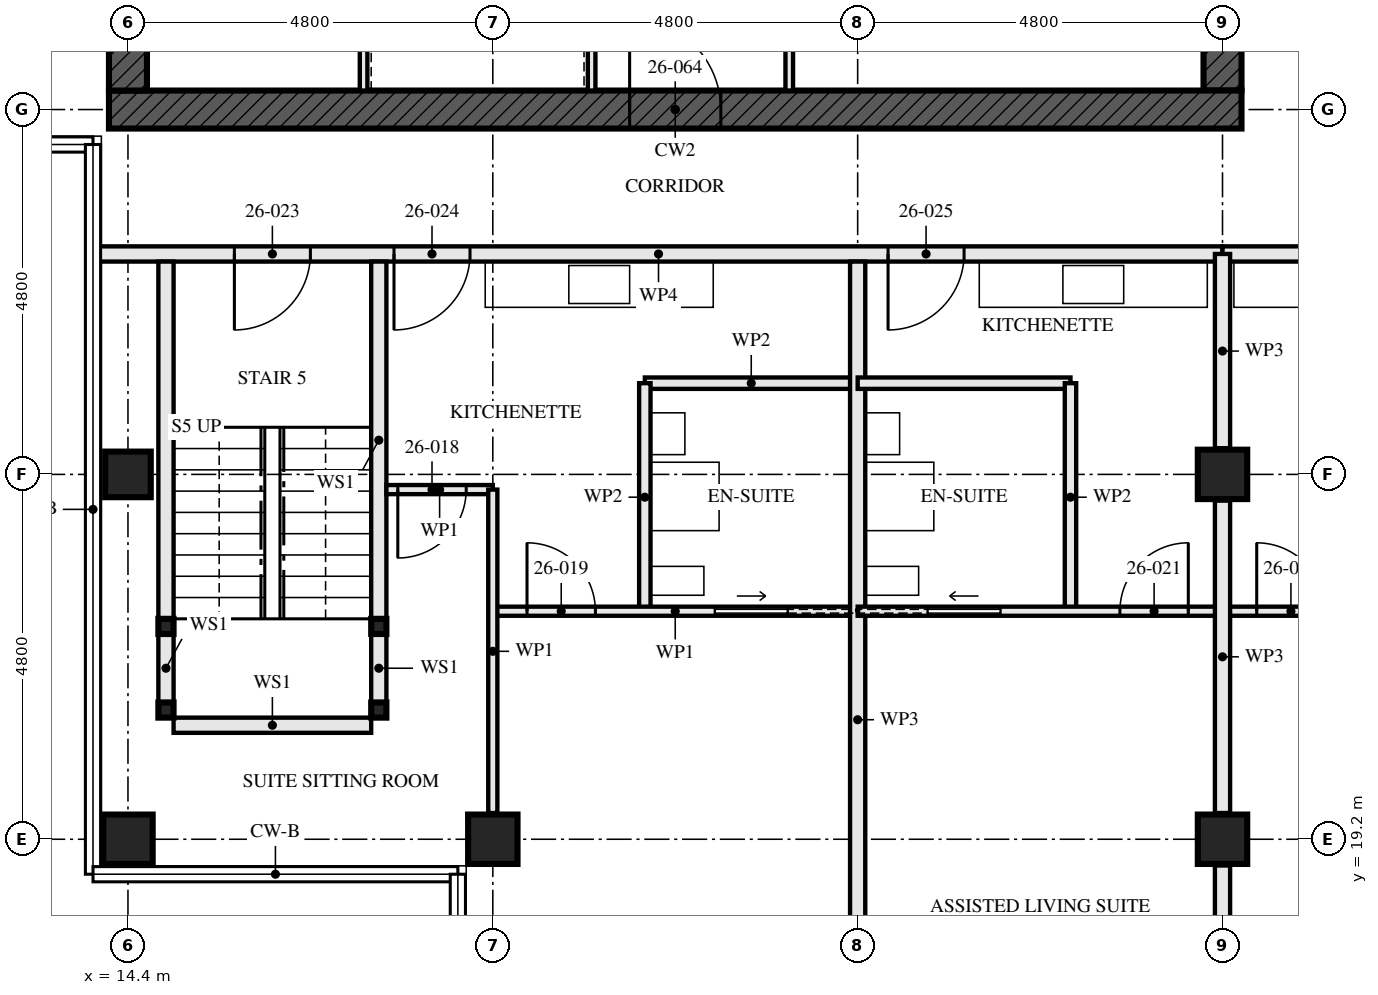
"""IFC4 building model, lengths in metres.
Left out: names, types, materials, properties, quantities, classifications, styles, units other than length and angle.
Written with IfcOpenShell. Run it as: python <this file> out.ifc"""

import sys

from ifc_helpers import new_model, si_unit, direction, frame, frame_2d, origin, origin_2d, place, context, subcontext, project, spatial, rectangle, hollow_rectangle, extrude, element, fill, save


model = new_model("IFC4")
c1 = context("Model", 3, precision=1e-05, world=origin(), true_north=direction((0.0, 1.0)))
c2 = subcontext(c1, "Body", "Model", "MODEL_VIEW")
j1 = project(units=[si_unit("LENGTHUNIT", "METRE"), si_unit("PLANEANGLEUNIT", "RADIAN")], contexts=[c1])
p1 = place(None, origin())
s1 = spatial("IfcSite", under=j1, at=p1, CompositionType="ELEMENT")
p2 = place(p1, origin())
s2 = spatial("IfcBuilding", under=s1, at=p2, CompositionType="ELEMENT")
p3 = place(p2, frame((0.0, 0.0, 98.0)))
s3 = spatial("IfcBuildingStorey", under=s2, at=p3, CompositionType="ELEMENT", Elevation=98.0)
p4 = place(p3, frame((14.4, 19.2, 0.0), z_axis=(0.0, 0.0, 1.0), x_axis=(0.0, 1.0, 0.0)))
e1 = element("IfcColumn", 1, at=p4, inside=s3, PredefinedType="COLUMN", context=c2, shape_type="SweptSolid", body=[
    extrude(hollow_rectangle(XDim=0.65, YDim=0.65, WallThickness=0.08, at=origin_2d()), origin(), (0.0, 0.0, 1.0), 3.5),
])
p5 = place(p3, frame((14.4, 24.0, 0.0), z_axis=(0.0, 0.0, 1.0), x_axis=(1.0, 0.0, 0.0)))
e2 = element("IfcColumn", 2, at=p5, inside=s3, PredefinedType="COLUMN", context=c2, shape_type="SweptSolid", body=[
    extrude(hollow_rectangle(XDim=0.6, YDim=0.6, WallThickness=0.08, at=origin_2d()), origin(), (0.0, 0.0, 1.0), 3.5),
])
p6 = place(p3, frame((19.2, 19.2, 0.0), z_axis=(0.0, 0.0, 1.0), x_axis=(0.0, 1.0, 0.0)))
e3 = element("IfcColumn", 3, at=p6, inside=s3, PredefinedType="COLUMN", context=c2, shape_type="SweptSolid", body=[
    extrude(hollow_rectangle(XDim=0.65, YDim=0.65, WallThickness=0.08, at=origin_2d()), origin(), (0.0, 0.0, 1.0), 3.5),
])
for number, where, z_axis, x_axis in (
    (4, (28.8, 19.2, 0.0), (0.0, 0.0, 1.0), (1.0, 0.0, 0.0)),
    (5, (28.8, 24.0, 0.0), (0.0, 0.0, 1.0), (1.0, 0.0, 0.0)),
):
    element("IfcColumn", number, at=place(p3, frame(where, z_axis=z_axis, x_axis=x_axis)), inside=s3, PredefinedType="COLUMN", context=c2, shape_type="SweptSolid", body=[
        extrude(hollow_rectangle(XDim=0.65, YDim=0.65, WallThickness=0.05, at=origin_2d()), origin(), (0.0, 0.0, 1.0), 3.5),
    ])
p7 = place(p3, frame((14.15, 28.8, -0.17), z_axis=(0.0, 0.0, 1.0), x_axis=(1.0, 0.0, 0.0)))
e6 = element("IfcWall", 6, at=p7, inside=s3, PredefinedType="SHEAR", context=c2, shape_type="SweptSolid", body=[
    extrude(rectangle(XDim=14.9, YDim=0.5, at=frame_2d((7.45, 0.0))), origin(), (0.0, 0.0, 1.0), 3.5),
])
p8 = place(p7, frame((6.85, 0.0, 0.17)))
e7 = element("IfcOpeningElement", 7, at=p8, cuts=e6, PredefinedType="OPENING", context=c2, shape_type="SweptSolid", body=[
    extrude(rectangle(XDim=1.2, YDim=2.1, at=frame_2d((0.6, 1.05))), frame((0.0, 0.26, 0.0), z_axis=(0.0, -1.0, 0.0), x_axis=(1.0, 0.0, 0.0)), (0.0, 0.0, 1.0), 0.521),
])
p9 = place(p3, frame((14.4, 42.95, -0.17), z_axis=(0.0, 0.0, 1.0), x_axis=(0.0, -1.0, 0.0)))
e8 = element("IfcWall", 8, at=p9, inside=s3, PredefinedType="SHEAR", context=c2, shape_type="SweptSolid", body=[
    extrude(rectangle(XDim=13.9, YDim=0.5, at=frame_2d((6.95, 0.0))), origin(), (0.0, 0.0, 1.0), 3.5),
])
p10 = place(p9, frame((6.35, 0.0, 0.17)))
e9 = element("IfcOpeningElement", 9, at=p10, cuts=e8, PredefinedType="OPENING", context=c2, shape_type="SweptSolid", body=[
    extrude(rectangle(XDim=1.2, YDim=2.1, at=frame_2d((0.6, 1.05))), frame((0.0, 0.26, 0.0), z_axis=(0.0, -1.0, 0.0), x_axis=(1.0, 0.0, 0.0)), (0.0, 0.0, 1.0), 0.521),
])
p11 = place(p3, frame((28.8, 29.05, -0.17), z_axis=(0.0, 0.0, 1.0), x_axis=(0.0, 1.0, 0.0)))
e10 = element("IfcWall", 10, at=p11, inside=s3, PredefinedType="SHEAR", context=c2, shape_type="SweptSolid", body=[
    extrude(rectangle(XDim=13.9, YDim=0.5, at=frame_2d((6.95, 0.0))), origin(), (0.0, 0.0, 1.0), 3.5),
])
p12 = place(p11, frame((6.35, 0.0, 0.17)))
e11 = element("IfcOpeningElement", 11, at=p12, cuts=e10, PredefinedType="OPENING", context=c2, shape_type="SweptSolid", body=[
    extrude(rectangle(XDim=1.2, YDim=2.1, at=frame_2d((0.6, 1.05))), frame((0.0, 0.26, 0.0), z_axis=(0.0, -1.0, 0.0), x_axis=(1.0, 0.0, 0.0)), (0.0, 0.0, 1.0), 0.521),
])
for number, where, z_axis, x_axis in (
    (12, (14.9, 20.9, 0.0), (0.0, 0.0, 1.0), (1.0, 0.0, 0.0)),
    (13, (17.7, 20.9, 0.0), (0.0, 0.0, 1.0), (1.0, 0.0, 0.0)),
    (14, (14.9, 22.0, 0.0), (0.0, 0.0, 1.0), (1.0, 0.0, 0.0)),
    (15, (17.7, 22.0, 0.0), (0.0, 0.0, 1.0), (1.0, 0.0, 0.0)),
):
    element("IfcColumn", number, at=place(p3, frame(where, z_axis=z_axis, x_axis=x_axis)), inside=s3, PredefinedType="COLUMN", context=c2, shape_type="SweptSolid", body=[
        extrude(hollow_rectangle(XDim=0.2, YDim=0.2, WallThickness=0.008, at=origin_2d()), origin(), (0.0, 0.0, 1.0), 3.33),
    ])
p13 = place(p3, frame((14.9, 21.0, 0.0), z_axis=(0.0, 0.0, 1.0), x_axis=(0.0, 1.0, 0.0)))
e16 = element("IfcWall", 16, at=p13, inside=s3, PredefinedType="SOLIDWALL", context=c2, shape_type="SweptSolid", body=[
    extrude(rectangle(XDim=0.9, YDim=0.2, at=frame_2d((0.45, 0.0))), origin(), (0.0, 0.0, 1.0), 2.99),
])
p14 = place(p3, frame((14.9, 22.1, 0.0), z_axis=(0.0, 0.0, 1.0), x_axis=(0.0, 1.0, 0.0)))
e17 = element("IfcWall", 17, at=p14, inside=s3, PredefinedType="SOLIDWALL", context=c2, shape_type="SweptSolid", body=[
    extrude(rectangle(XDim=4.7, YDim=0.2, at=frame_2d((2.35, 0.0))), origin(), (0.0, 0.0, 1.0), 2.99),
])
p15 = place(p3, frame((17.7, 21.0, 0.0), z_axis=(0.0, 0.0, 1.0), x_axis=(0.0, 1.0, 0.0)))
e18 = element("IfcWall", 18, at=p15, inside=s3, PredefinedType="SOLIDWALL", context=c2, shape_type="SweptSolid", body=[
    extrude(rectangle(XDim=0.9, YDim=0.2, at=frame_2d((0.45, 0.0))), origin(), (0.0, 0.0, 1.0), 2.99),
])
p16 = place(p3, frame((17.7, 22.1, 0.0), z_axis=(0.0, 0.0, 1.0), x_axis=(0.0, 1.0, 0.0)))
e19 = element("IfcWall", 19, at=p16, inside=s3, PredefinedType="SOLIDWALL", context=c2, shape_type="SweptSolid", body=[
    extrude(rectangle(XDim=4.7, YDim=0.2, at=frame_2d((2.35, 0.0))), origin(), (0.0, 0.0, 1.0), 2.99),
])
p17 = place(p3, frame((15.0, 20.7, 0.0), z_axis=(0.0, 0.0, 1.0), x_axis=(1.0, 0.0, 0.0)))
e20 = element("IfcWall", 20, at=p17, inside=s3, PredefinedType="SOLIDWALL", context=c2, shape_type="SweptSolid", body=[
    extrude(rectangle(XDim=2.6, YDim=0.2, at=frame_2d((1.3, 0.0))), origin(), (0.0, 0.0, 1.0), 3.33),
])
p18 = place(p3, frame((21.2, 22.2, 0.0), z_axis=(0.0, 0.0, 1.0), x_axis=(0.0, 1.0, 0.0)))
e21 = element("IfcWall", 21, at=p18, inside=s3, PredefinedType="PARTITIONING", context=c2, shape_type="SweptSolid", body=[
    extrude(rectangle(XDim=3.0, YDim=0.15, at=frame_2d((1.5, 0.0))), origin(), (0.0, 0.0, 1.0), 2.55),
])
p19 = place(p3, frame((21.2, 25.2, 0.0), z_axis=(0.0, 0.0, 1.0), x_axis=(1.0, 0.0, 0.0)))
e22 = element("IfcWall", 22, at=p19, inside=s3, PredefinedType="PARTITIONING", context=c2, shape_type="SweptSolid", body=[
    extrude(rectangle(XDim=2.8, YDim=0.15, at=frame_2d((1.4, 0.0))), origin(), (0.0, 0.0, 1.0), 3.33),
])
p20 = place(p3, frame((17.8, 23.8, 0.0), z_axis=(0.0, 0.0, 1.0), x_axis=(1.0, 0.0, 0.0)))
e23 = element("IfcWall", 23, at=p20, inside=s3, PredefinedType="PARTITIONING", context=c2, shape_type="SweptSolid", body=[
    extrude(rectangle(XDim=1.4, YDim=0.12, at=frame_2d((0.7, 0.0))), origin(), (0.0, 0.0, 1.0), 3.33),
])
p21 = place(p20, frame((0.15, 0.0, 0.0)))
e24 = element("IfcOpeningElement", 24, at=p21, cuts=e23, PredefinedType="OPENING", context=c2, shape_type="SweptSolid", body=[
    extrude(rectangle(XDim=0.9, YDim=2.1, at=frame_2d((0.45, 1.05))), frame((0.0, 0.071, 0.0), z_axis=(0.0, -1.0, 0.0), x_axis=(1.0, 0.0, 0.0)), (0.0, 0.0, 1.0), 0.141),
])
p22 = place(p3, frame((19.2, 22.2, 0.0), z_axis=(0.0, 0.0, 1.0), x_axis=(1.0, 0.0, 0.0)))
e25 = element("IfcWall", 25, at=p22, inside=s3, PredefinedType="PARTITIONING", context=c2, shape_type="SweptSolid", body=[
    extrude(rectangle(XDim=4.8, YDim=0.12, at=frame_2d((2.4, 0.0))), origin(), (0.0, 0.0, 1.0), 3.33),
])
p23 = place(p22, frame((0.45, 0.0, 0.0)))
e26 = element("IfcOpeningElement", 26, at=p23, cuts=e25, PredefinedType="OPENING", context=c2, shape_type="SweptSolid", body=[
    extrude(rectangle(XDim=0.9, YDim=2.1, at=frame_2d((0.45, 1.05))), frame((0.0, 0.071, 0.0), z_axis=(0.0, -1.0, 0.0), x_axis=(1.0, 0.0, 0.0)), (0.0, 0.0, 1.0), 0.141),
])
p24 = place(p22, frame((2.925, 0.0, 0.0)))
e27 = element("IfcOpeningElement", 27, at=p24, cuts=e25, PredefinedType="OPENING", context=c2, shape_type="SweptSolid", body=[
    extrude(rectangle(XDim=0.95, YDim=2.1, at=frame_2d((0.475, 1.05))), frame((0.0, 0.071, 0.0), z_axis=(0.0, -1.0, 0.0), x_axis=(1.0, 0.0, 0.0)), (0.0, 0.0, 1.0), 0.141),
])
p25 = place(p3, frame((19.2, 19.545, 0.0), z_axis=(0.0, 0.0, 1.0), x_axis=(0.0, 1.0, 0.0)))
e28 = element("IfcWall", 28, at=p25, inside=s3, PredefinedType="PARTITIONING", context=c2, shape_type="SweptSolid", body=[
    extrude(rectangle(XDim=4.255, YDim=0.12, at=frame_2d((2.127, 0.0))), origin(), (0.0, 0.0, 1.0), 2.55),
])
p26 = place(p3, frame((24.0, 14.745, 0.0), z_axis=(0.0, 0.0, 1.0), x_axis=(0.0, 1.0, 0.0)))
e29 = element("IfcWall", 29, at=p26, inside=s3, PredefinedType="PARTITIONING", context=c2, shape_type="SweptSolid", body=[
    extrude(rectangle(XDim=12.055, YDim=0.2, at=frame_2d((6.027, 0.0))), origin(), (0.0, 0.0, 1.0), 2.55),
])
p27 = place(p3, frame((26.8, 22.2, 0.0), z_axis=(0.0, 0.0, 1.0), x_axis=(0.0, 1.0, 0.0)))
e30 = element("IfcWall", 30, at=p27, inside=s3, PredefinedType="PARTITIONING", context=c2, shape_type="SweptSolid", body=[
    extrude(rectangle(XDim=3.0, YDim=0.15, at=frame_2d((1.5, 0.0))), origin(), (0.0, 0.0, 1.0), 2.55),
])
p28 = place(p3, frame((24.0, 25.2, 0.0), z_axis=(0.0, 0.0, 1.0), x_axis=(1.0, 0.0, 0.0)))
e31 = element("IfcWall", 31, at=p28, inside=s3, PredefinedType="PARTITIONING", context=c2, shape_type="SweptSolid", body=[
    extrude(rectangle(XDim=2.8, YDim=0.15, at=frame_2d((1.4, 0.0))), origin(), (0.0, 0.0, 1.0), 3.33),
])
p29 = place(p3, frame((24.0, 22.2, 0.0), z_axis=(0.0, 0.0, 1.0), x_axis=(1.0, 0.0, 0.0)))
e32 = element("IfcWall", 32, at=p29, inside=s3, PredefinedType="PARTITIONING", context=c2, shape_type="SweptSolid", body=[
    extrude(rectangle(XDim=4.8, YDim=0.12, at=frame_2d((2.4, 0.0))), origin(), (0.0, 0.0, 1.0), 3.33),
])
p30 = place(p29, frame((3.45, 0.0, 0.0)))
e33 = element("IfcOpeningElement", 33, at=p30, cuts=e32, PredefinedType="OPENING", context=c2, shape_type="SweptSolid", body=[
    extrude(rectangle(XDim=0.9, YDim=2.1, at=frame_2d((0.45, 1.05))), frame((0.0, 0.071, 0.0), z_axis=(0.0, -1.0, 0.0), x_axis=(1.0, 0.0, 0.0)), (0.0, 0.0, 1.0), 0.141),
])
p31 = place(p29, frame((0.925, 0.0, 0.0)))
e34 = element("IfcOpeningElement", 34, at=p31, cuts=e32, PredefinedType="OPENING", context=c2, shape_type="SweptSolid", body=[
    extrude(rectangle(XDim=0.95, YDim=2.1, at=frame_2d((0.475, 1.05))), frame((0.0, 0.071, 0.0), z_axis=(0.0, -1.0, 0.0), x_axis=(1.0, 0.0, 0.0)), (0.0, 0.0, 1.0), 0.141),
])
p32 = place(p3, frame((13.96, 26.9, 0.0), z_axis=(0.0, 0.0, 1.0), x_axis=(1.0, 0.0, 0.0)))
e35 = element("IfcWall", 35, at=p32, inside=s3, PredefinedType="PARTITIONING", context=c2, shape_type="SweptSolid", body=[
    extrude(rectangle(XDim=14.84, YDim=0.2, at=frame_2d((7.42, 0.0))), origin(), (0.0, 0.0, 1.0), 2.32),
])
p33 = place(p32, frame((1.84, 0.0, 0.0)))
e36 = element("IfcOpeningElement", 36, at=p33, cuts=e35, PredefinedType="OPENING", context=c2, shape_type="SweptSolid", body=[
    extrude(rectangle(XDim=1.0, YDim=2.1, at=frame_2d((0.5, 1.05))), frame((0.0, 0.111, 0.0), z_axis=(0.0, -1.0, 0.0), x_axis=(1.0, 0.0, 0.0)), (0.0, 0.0, 1.0), 0.221),
])
p34 = place(p32, frame((3.94, 0.0, 0.0)))
e37 = element("IfcOpeningElement", 37, at=p34, cuts=e35, PredefinedType="OPENING", context=c2, shape_type="SweptSolid", body=[
    extrude(rectangle(XDim=1.0, YDim=2.1, at=frame_2d((0.5, 1.05))), frame((0.0, 0.111, 0.0), z_axis=(0.0, -1.0, 0.0), x_axis=(1.0, 0.0, 0.0)), (0.0, 0.0, 1.0), 0.221),
])
p35 = place(p32, frame((10.44, 0.0, 0.0)))
e38 = element("IfcOpeningElement", 38, at=p35, cuts=e35, PredefinedType="OPENING", context=c2, shape_type="SweptSolid", body=[
    extrude(rectangle(XDim=1.0, YDim=2.1, at=frame_2d((0.5, 1.05))), frame((0.0, 0.111, 0.0), z_axis=(0.0, -1.0, 0.0), x_axis=(1.0, 0.0, 0.0)), (0.0, 0.0, 1.0), 0.221),
])
p36 = place(p3, frame((28.8, 22.2, 0.0), z_axis=(0.0, 0.0, 1.0), x_axis=(1.0, 0.0, 0.0)))
e39 = element("IfcWall", 39, at=p36, inside=s3, PredefinedType="PARTITIONING", context=c2, shape_type="SweptSolid", body=[
    extrude(rectangle(XDim=4.8, YDim=0.12, at=frame_2d((2.4, 0.0))), origin(), (0.0, 0.0, 1.0), 3.33),
])
p37 = place(p36, frame((0.45, 0.0, 0.0)))
e40 = element("IfcOpeningElement", 40, at=p37, cuts=e39, PredefinedType="OPENING", context=c2, shape_type="SweptSolid", body=[
    extrude(rectangle(XDim=0.9, YDim=2.1, at=frame_2d((0.45, 1.05))), frame((0.0, 0.071, 0.0), z_axis=(0.0, -1.0, 0.0), x_axis=(1.0, 0.0, 0.0)), (0.0, 0.0, 1.0), 0.141),
])
p38 = place(p3, frame((28.8, 26.9, 0.0), z_axis=(0.0, 0.0, 1.0), x_axis=(1.0, 0.0, 0.0)))
e41 = element("IfcWall", 41, at=p38, inside=s3, PredefinedType="PARTITIONING", context=c2, shape_type="SweptSolid", body=[
    extrude(rectangle(XDim=9.6, YDim=0.2, at=frame_2d((4.8, 0.0))), origin(), (0.0, 0.0, 1.0), 3.33),
])
p39 = place(p38, frame((5.2, 0.0, 0.0)))
e42 = element("IfcOpeningElement", 42, at=p39, cuts=e41, PredefinedType="OPENING", context=c2, shape_type="SweptSolid", body=[
    extrude(rectangle(XDim=1.0, YDim=2.1, at=frame_2d((0.5, 1.05))), frame((0.0, 0.111, 0.0), z_axis=(0.0, -1.0, 0.0), x_axis=(1.0, 0.0, 0.0)), (0.0, 0.0, 1.0), 0.221),
])
p40 = place(p3, frame((20.5, 29.05, 0.0), z_axis=(0.0, 0.0, 1.0), x_axis=(0.0, 1.0, 0.0)))
e43 = element("IfcWall", 43, at=p40, inside=s3, PredefinedType="SOLIDWALL", context=c2, shape_type="SweptSolid", body=[
    extrude(rectangle(XDim=5.8, YDim=0.1, at=frame_2d((2.9, 0.0))), origin(), (0.0, 0.0, 1.0), 3.33),
])
p41 = place(p40, frame((0.8, 0.0, 0.0)))
e44 = element("IfcOpeningElement", 44, at=p41, cuts=e43, PredefinedType="OPENING", context=c2, shape_type="SweptSolid", body=[
    extrude(rectangle(XDim=1.1, YDim=2.3, at=frame_2d((0.55, 1.15))), frame((0.0, 0.061, 0.0), z_axis=(0.0, -1.0, 0.0), x_axis=(1.0, 0.0, 0.0)), (0.0, 0.0, 1.0), 0.121),
])
p42 = place(p40, frame((3.775, 0.0, 0.0)))
e45 = element("IfcOpeningElement", 45, at=p42, cuts=e43, PredefinedType="OPENING", context=c2, shape_type="SweptSolid", body=[
    extrude(rectangle(XDim=1.1, YDim=2.3, at=frame_2d((0.55, 1.15))), frame((0.0, 0.061, 0.0), z_axis=(0.0, -1.0, 0.0), x_axis=(1.0, 0.0, 0.0)), (0.0, 0.0, 1.0), 0.121),
])
p43 = place(p3, frame((23.1, 29.05, 0.0), z_axis=(0.0, 0.0, 1.0), x_axis=(0.0, 1.0, 0.0)))
e46 = element("IfcWall", 46, at=p43, inside=s3, PredefinedType="SOLIDWALL", context=c2, shape_type="SweptSolid", body=[
    extrude(rectangle(XDim=5.8, YDim=0.1, at=frame_2d((2.9, 0.0))), origin(), (0.0, 0.0, 1.0), 3.33),
])
p44 = place(p43, frame((1.0, 0.0, 0.0)))
e47 = element("IfcOpeningElement", 47, at=p44, cuts=e46, PredefinedType="OPENING", context=c2, shape_type="SweptSolid", body=[
    extrude(rectangle(XDim=0.7, YDim=2.1, at=frame_2d((0.35, 1.05))), frame((0.0, 0.061, 0.0), z_axis=(0.0, -1.0, 0.0), x_axis=(1.0, 0.0, 0.0)), (0.0, 0.0, 1.0), 0.121),
])
p45 = place(p3, frame((17.5, 29.05, 0.0), z_axis=(0.0, 0.0, 1.0), x_axis=(0.0, 1.0, 0.0)))
e48 = element("IfcWall", 48, at=p45, inside=s3, PredefinedType="SOLIDWALL", context=c2, shape_type="SweptSolid", body=[
    extrude(rectangle(XDim=5.8, YDim=0.1, at=frame_2d((2.9, 0.0))), origin(), (0.0, 0.0, 1.0), 3.33),
])
p46 = place(p3, frame((28.8, 14.647, 0.0), z_axis=(0.0, 0.0, 1.0), x_axis=(0.0, 1.0, 0.0)))
e49 = element("IfcWall", 49, at=p46, inside=s3, PredefinedType="PARTITIONING", context=c2, shape_type="SweptSolid", body=[
    extrude(rectangle(XDim=4.208, YDim=0.2, at=frame_2d((2.104, 0.0))), origin(), (0.0, 0.0, 1.0), 2.32),
])
p47 = place(p3, frame((28.8, 19.545, 0.0), z_axis=(0.0, 0.0, 1.0), x_axis=(0.0, 1.0, 0.0)))
e50 = element("IfcWall", 50, at=p47, inside=s3, PredefinedType="PARTITIONING", context=c2, shape_type="SweptSolid", body=[
    extrude(rectangle(XDim=4.11, YDim=0.2, at=frame_2d((2.055, 0.0))), origin(), (0.0, 0.0, 1.0), 2.32),
])
p48 = place(p3, frame((28.8, 24.345, 0.0), z_axis=(0.0, 0.0, 1.0), x_axis=(0.0, 1.0, 0.0)))
e51 = element("IfcWall", 51, at=p48, inside=s3, PredefinedType="PARTITIONING", context=c2, shape_type="SweptSolid", body=[
    extrude(rectangle(XDim=2.555, YDim=0.2, at=frame_2d((1.277, 0.0))), origin(), (0.0, 0.0, 1.0), 2.32),
])
p49 = place(p21, frame((0.9, 0.0, 0.0), z_axis=(0.0, 0.0, 1.0), x_axis=(-1.0, 0.0, 0.0)))
e52 = element("IfcDoor", 52, at=p49, inside=s3, OperationType="SINGLE_SWING_LEFT", PredefinedType="DOOR", context=c2, shape_type="SweptSolid", body=[
    extrude(rectangle(XDim=0.9, YDim=2.1, at=frame_2d((0.45, 1.05))), frame((0.0, 0.022, 0.0), z_axis=(0.0, -1.0, 0.0), x_axis=(1.0, 0.0, 0.0)), (0.0, 0.0, 1.0), 0.044),
])
fill(e24, e52)
p50 = place(p23, origin())
e53 = element("IfcDoor", 53, at=p50, inside=s3, OperationType="SINGLE_SWING_RIGHT", PredefinedType="DOOR", context=c2, shape_type="SweptSolid", body=[
    extrude(rectangle(XDim=0.9, YDim=2.1, at=frame_2d((0.45, 1.05))), frame((0.0, 0.022, 0.0), z_axis=(0.0, -1.0, 0.0), x_axis=(1.0, 0.0, 0.0)), (0.0, 0.0, 1.0), 0.044),
])
fill(e26, e53)
p51 = place(p24, origin())
e54 = element("IfcDoor", 54, at=p51, inside=s3, OperationType="SLIDING_TO_LEFT", PredefinedType="DOOR", context=c2, shape_type="SweptSolid", body=[
    extrude(rectangle(XDim=0.95, YDim=2.1, at=frame_2d((0.475, 1.05))), frame((0.0, 0.022, 0.0), z_axis=(0.0, -1.0, 0.0), x_axis=(1.0, 0.0, 0.0)), (0.0, 0.0, 1.0), 0.044),
])
fill(e27, e54)
p52 = place(p30, origin())
e55 = element("IfcDoor", 55, at=p52, inside=s3, OperationType="SINGLE_SWING_LEFT", PredefinedType="DOOR", context=c2, shape_type="SweptSolid", body=[
    extrude(rectangle(XDim=0.9, YDim=2.1, at=frame_2d((0.45, 1.05))), frame((0.0, 0.022, 0.0), z_axis=(0.0, -1.0, 0.0), x_axis=(1.0, 0.0, 0.0)), (0.0, 0.0, 1.0), 0.044),
])
fill(e33, e55)
p53 = place(p31, origin())
e56 = element("IfcDoor", 56, at=p53, inside=s3, OperationType="SLIDING_TO_RIGHT", PredefinedType="DOOR", context=c2, shape_type="SweptSolid", body=[
    extrude(rectangle(XDim=0.95, YDim=2.1, at=frame_2d((0.475, 1.05))), frame((0.0, 0.022, 0.0), z_axis=(0.0, -1.0, 0.0), x_axis=(1.0, 0.0, 0.0)), (0.0, 0.0, 1.0), 0.044),
])
fill(e34, e56)
p54 = place(p33, frame((1.0, 0.0, 0.0), z_axis=(0.0, 0.0, 1.0), x_axis=(-1.0, 0.0, 0.0)))
e57 = element("IfcDoor", 57, at=p54, inside=s3, OperationType="SINGLE_SWING_LEFT", PredefinedType="DOOR", context=c2, shape_type="SweptSolid", body=[
    extrude(rectangle(XDim=1.0, YDim=2.1, at=frame_2d((0.5, 1.05))), frame((0.0, 0.032, 0.0), z_axis=(0.0, -1.0, 0.0), x_axis=(1.0, 0.0, 0.0)), (0.0, 0.0, 1.0), 0.064),
])
fill(e36, e57)
p55 = place(p34, frame((1.0, 0.0, 0.0), z_axis=(0.0, 0.0, 1.0), x_axis=(-1.0, 0.0, 0.0)))
e58 = element("IfcDoor", 58, at=p55, inside=s3, OperationType="SINGLE_SWING_LEFT", PredefinedType="DOOR", context=c2, shape_type="SweptSolid", body=[
    extrude(rectangle(XDim=1.0, YDim=2.1, at=frame_2d((0.5, 1.05))), frame((0.0, 0.027, 0.0), z_axis=(0.0, -1.0, 0.0), x_axis=(1.0, 0.0, 0.0)), (0.0, 0.0, 1.0), 0.054),
])
fill(e37, e58)
p56 = place(p35, frame((1.0, 0.0, 0.0), z_axis=(0.0, 0.0, 1.0), x_axis=(-1.0, 0.0, 0.0)))
e59 = element("IfcDoor", 59, at=p56, inside=s3, OperationType="SINGLE_SWING_LEFT", PredefinedType="DOOR", context=c2, shape_type="SweptSolid", body=[
    extrude(rectangle(XDim=1.0, YDim=2.1, at=frame_2d((0.5, 1.05))), frame((0.0, 0.027, 0.0), z_axis=(0.0, -1.0, 0.0), x_axis=(1.0, 0.0, 0.0)), (0.0, 0.0, 1.0), 0.054),
])
fill(e38, e59)
p57 = place(p37, origin())
e60 = element("IfcDoor", 60, at=p57, inside=s3, OperationType="SINGLE_SWING_RIGHT", PredefinedType="DOOR", context=c2, shape_type="SweptSolid", body=[
    extrude(rectangle(XDim=0.9, YDim=2.1, at=frame_2d((0.45, 1.05))), frame((0.0, 0.022, 0.0), z_axis=(0.0, -1.0, 0.0), x_axis=(1.0, 0.0, 0.0)), (0.0, 0.0, 1.0), 0.044),
])
fill(e40, e60)
p58 = place(p8, origin())
e61 = element("IfcDoor", 61, at=p58, inside=s3, OperationType="SINGLE_SWING_LEFT", PredefinedType="DOOR", context=c2, shape_type="SweptSolid", body=[
    extrude(rectangle(XDim=1.2, YDim=2.1, at=frame_2d((0.6, 1.05))), frame((0.0, 0.027, 0.0), z_axis=(0.0, -1.0, 0.0), x_axis=(1.0, 0.0, 0.0)), (0.0, 0.0, 1.0), 0.054),
])
fill(e7, e61)
save(model, sys.argv[1])
